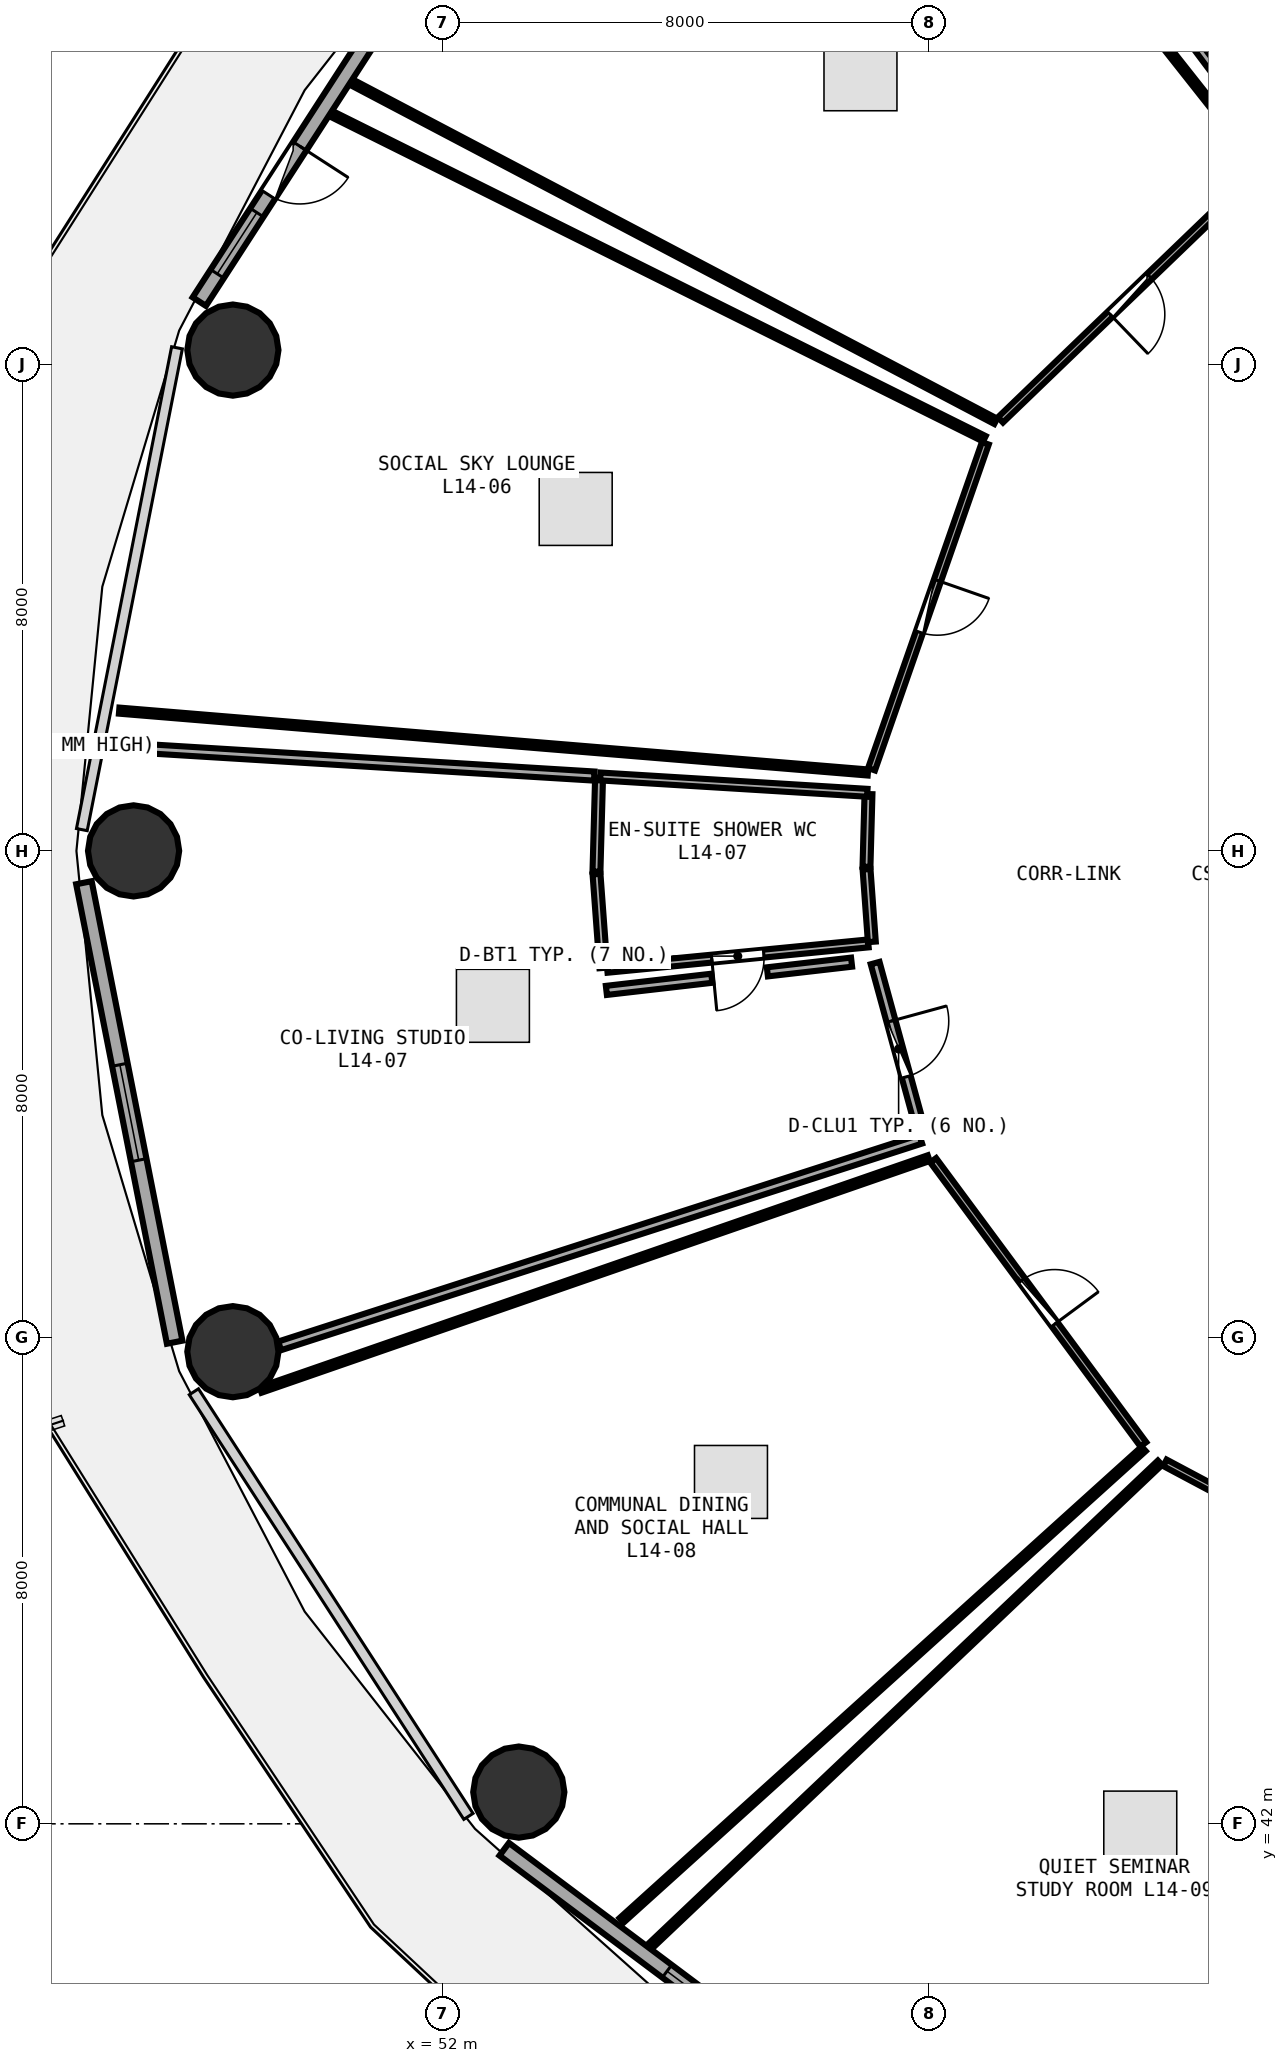
"""IFC4 building model, lengths in metres.
Left out: names, types, materials, properties, quantities, classifications, styles, units other than length and angle.
Written with IfcOpenShell. Run it as: python <this file> out.ifc"""

import sys

from ifc_helpers import new_model, si_unit, direction, frame, frame_2d, origin, origin_2d, place, context, subcontext, project, spatial, rectangle, circle, extrude, element, fill, save


model = new_model("IFC4")
c1 = context("Model", 3, precision=1e-05, world=origin(), true_north=direction((0.0, 1.0)))
c2 = subcontext(c1, "Body", "Model", "MODEL_VIEW")
j1 = project(units=[si_unit("LENGTHUNIT", "METRE"), si_unit("PLANEANGLEUNIT", "RADIAN")], contexts=[c1])
p1 = place(None, origin())
s1 = spatial("IfcSite", under=j1, at=p1, CompositionType="ELEMENT")
p2 = place(p1, origin())
s2 = spatial("IfcBuilding", under=s1, at=p2, CompositionType="ELEMENT")
p3 = place(p2, frame((0.0, 0.0, 56.25)))
s3 = spatial("IfcBuildingStorey", under=s2, at=p3, CompositionType="ELEMENT", Elevation=56.25)
for number, where, z_axis, x_axis in (
    (1, (48.553, 66.236, 0.0), (0.0, 0.0, 1.0), (1.0, 0.0, 0.0)),
    (2, (46.92, 58.0, 0.0), (0.0, 0.0, 1.0), (1.0, 0.0, 0.0)),
    (3, (48.553, 49.764, 0.0), (0.0, 0.0, 1.0), (1.0, 0.0, 0.0)),
    (4, (53.256, 42.522, 0.0), (0.0, 0.0, 1.0), (1.0, 0.0, 0.0)),
):
    element("IfcColumn", number, at=place(p3, frame(where, z_axis=z_axis, x_axis=x_axis)), inside=s3, PredefinedType="COLUMN", context=c2, shape_type="SweptSolid", body=[
        extrude(circle(Radius=0.75, at=origin_2d()), origin(), (0.0, 0.0, 1.0), 3.75),
    ])
p4 = place(p3, frame((52.311, 73.698, 0.0), z_axis=(0.0, 0.0, 1.0), x_axis=(-0.543005114258, -0.839729388488, 0.0)))
e5 = element("IfcWall", 5, at=p4, inside=s3, PredefinedType="SOLIDWALL", context=c2, shape_type="SweptSolid", body=[
    extrude(rectangle(XDim=7.938, YDim=0.26, at=frame_2d((3.969, 0.0))), origin(), (0.0, 0.0, 1.0), 3.475),
])
p5 = place(p4, frame((4.894, 0.0, 0.0)))
e6 = element("IfcOpeningElement", 6, at=p5, cuts=e5, PredefinedType="OPENING", context=c2, shape_type="SweptSolid", body=[
    extrude(rectangle(XDim=0.95, YDim=2.1, at=frame_2d((0.475, 1.05))), frame((0.0, 0.14, 0.0), z_axis=(0.0, -1.0, 0.0), x_axis=(1.0, 0.0, 0.0)), (0.0, 0.0, 1.0), 0.28),
])
p6 = place(p4, frame((6.194, 0.0, 0.85)))
e7 = element("IfcOpeningElement", 7, at=p6, cuts=e5, PredefinedType="OPENING", context=c2, shape_type="SweptSolid", body=[
    extrude(rectangle(XDim=1.2, YDim=1.45, at=frame_2d((0.6, 0.725))), frame((0.0, 0.14, 0.0), z_axis=(0.0, -1.0, 0.0), x_axis=(1.0, 0.0, 0.0)), (0.0, 0.0, 1.0), 0.28),
])
p7 = place(p3, frame((46.104, 57.477, 0.0), z_axis=(0.0, 0.0, 1.0), x_axis=(0.193726159581, -0.98105564322, 0.0)))
e8 = element("IfcWall", 8, at=p7, inside=s3, PredefinedType="SOLIDWALL", context=c2, shape_type="SweptSolid", body=[
    extrude(rectangle(XDim=7.703, YDim=0.26, at=frame_2d((3.851, 0.0))), origin(), (0.0, 0.0, 1.0), 3.475),
])
p8 = place(p7, frame((3.051, 0.0, 0.85)))
e9 = element("IfcOpeningElement", 9, at=p8, cuts=e8, PredefinedType="OPENING", context=c2, shape_type="SweptSolid", body=[
    extrude(rectangle(XDim=1.6, YDim=1.45, at=frame_2d((0.8, 0.725))), frame((0.0, 0.14, 0.0), z_axis=(0.0, -1.0, 0.0), x_axis=(1.0, 0.0, 0.0)), (0.0, 0.0, 1.0), 0.28),
])
p9 = place(p3, frame((53.016, 41.582, 0.0), z_axis=(0.0, 0.0, 1.0), x_axis=(0.80030733173, -0.599590005569, 0.0)))
e10 = element("IfcWall", 10, at=p9, inside=s3, PredefinedType="SOLIDWALL", context=c2, shape_type="SweptSolid", body=[
    extrude(rectangle(XDim=8.291, YDim=0.26, at=frame_2d((4.145, 0.0))), origin(), (0.0, 0.0, 1.0), 3.475),
])
p10 = place(p9, frame((3.345, 0.0, 0.85)))
e11 = element("IfcOpeningElement", 11, at=p10, cuts=e10, PredefinedType="OPENING", context=c2, shape_type="SweptSolid", body=[
    extrude(rectangle(XDim=1.6, YDim=1.45, at=frame_2d((0.8, 0.725))), frame((0.0, 0.14, 0.0), z_axis=(0.0, -1.0, 0.0), x_axis=(1.0, 0.0, 0.0)), (0.0, 0.0, 1.0), 0.28),
])
p11 = place(p3, frame((65.432, 69.183, 0.0), z_axis=(0.0, 0.0, 1.0), x_axis=(-0.720434955678, -0.69352251199, 0.0)))
e12 = element("IfcWall", 12, at=p11, inside=s3, PredefinedType="PARTITIONING", context=c2, shape_type="SweptSolid", body=[
    extrude(rectangle(XDim=5.906, YDim=0.12, at=frame_2d((2.953, 0.0))), origin(), (0.0, 0.0, 1.0), 2.875),
])
p12 = place(p11, frame((2.503, 0.0, 0.0)))
e13 = element("IfcOpeningElement", 13, at=p12, cuts=e12, PredefinedType="OPENING", context=c2, shape_type="SweptSolid", body=[
    extrude(rectangle(XDim=0.9, YDim=2.08, at=frame_2d((0.45, 1.04))), frame((0.0, 0.07, 0.0), z_axis=(0.0, -1.0, 0.0), x_axis=(1.0, 0.0, 0.0)), (0.0, 0.0, 1.0), 0.14),
])
p13 = place(p3, frame((60.928, 64.702, 0.0), z_axis=(0.0, 0.0, 1.0), x_axis=(-0.329626249966, -0.944111505773, 0.0)))
e14 = element("IfcWall", 14, at=p13, inside=s3, PredefinedType="PARTITIONING", context=c2, shape_type="SweptSolid", body=[
    extrude(rectangle(XDim=5.677, YDim=0.12, at=frame_2d((2.839, 0.0))), origin(), (0.0, 0.0, 1.0), 3.48),
])
p14 = place(p13, frame((2.389, 0.0, 0.0)))
e15 = element("IfcOpeningElement", 15, at=p14, cuts=e14, PredefinedType="OPENING", context=c2, shape_type="SweptSolid", body=[
    extrude(rectangle(XDim=0.9, YDim=2.08, at=frame_2d((0.45, 1.04))), frame((0.0, 0.07, 0.0), z_axis=(0.0, -1.0, 0.0), x_axis=(1.0, 0.0, 0.0)), (0.0, 0.0, 1.0), 0.14),
])
p15 = place(p3, frame((59.003, 56.478, 0.0), z_axis=(0.0, 0.0, 1.0), x_axis=(-0.995308448338, -0.096752739847, 0.0)))
e16 = element("IfcWall", 16, at=p15, inside=s3, PredefinedType="PLUMBINGWALL", context=c2, shape_type="SweptSolid", body=[
    extrude(rectangle(XDim=4.315, YDim=0.13, at=frame_2d((2.157, 0.0))), origin(), (0.0, 0.0, 1.0), 3.175),
])
p16 = place(p15, frame((1.727, 0.0, 0.0)))
e17 = element("IfcOpeningElement", 17, at=p16, cuts=e16, PredefinedType="OPENING", context=c2, shape_type="SweptSolid", body=[
    extrude(rectangle(XDim=0.86, YDim=2.05, at=frame_2d((0.43, 1.025))), frame((0.0, 0.075, 0.0), z_axis=(0.0, -1.0, 0.0), x_axis=(1.0, 0.0, 0.0)), (0.0, 0.0, 1.0), 0.15),
])
p17 = place(p3, frame((59.116, 56.155, 0.0), z_axis=(0.0, 0.0, 1.0), x_axis=(0.263653235341, -0.964617526014, 0.0)))
e18 = element("IfcWall", 18, at=p17, inside=s3, PredefinedType="PARTITIONING", context=c2, shape_type="SweptSolid", body=[
    extrude(rectangle(XDim=2.93, YDim=0.15, at=frame_2d((1.465, 0.0))), origin(), (0.0, 0.0, 1.0), 3.48),
])
p18 = place(p17, frame((0.99, 0.0, 0.0)))
e19 = element("IfcOpeningElement", 19, at=p18, cuts=e18, PredefinedType="OPENING", context=c2, shape_type="SweptSolid", body=[
    extrude(rectangle(XDim=0.95, YDim=2.08, at=frame_2d((0.475, 1.04))), frame((0.0, 0.085, 0.0), z_axis=(0.0, -1.0, 0.0), x_axis=(1.0, 0.0, 0.0)), (0.0, 0.0, 1.0), 0.17),
])
p19 = place(p3, frame((60.071, 52.912, 0.0), z_axis=(0.0, 0.0, 1.0), x_axis=(0.594763174801, -0.80390096772, 0.0)))
e20 = element("IfcWall", 20, at=p19, inside=s3, PredefinedType="PARTITIONING", context=c2, shape_type="SweptSolid", body=[
    extrude(rectangle(XDim=5.81, YDim=0.12, at=frame_2d((2.905, 0.0))), origin(), (0.0, 0.0, 1.0), 2.875),
])
p20 = place(p19, frame((2.455, 0.0, 0.0)))
e21 = element("IfcOpeningElement", 21, at=p20, cuts=e20, PredefinedType="OPENING", context=c2, shape_type="SweptSolid", body=[
    extrude(rectangle(XDim=0.9, YDim=2.08, at=frame_2d((0.45, 1.04))), frame((0.0, 0.07, 0.0), z_axis=(0.0, -1.0, 0.0), x_axis=(1.0, 0.0, 0.0)), (0.0, 0.0, 1.0), 0.14),
])
p21 = place(p3, frame((63.882, 47.937, 0.0), z_axis=(0.0, 0.0, 1.0), x_axis=(0.882584601599, -0.470153614279, 0.0)))
e22 = element("IfcWall", 22, at=p21, inside=s3, PredefinedType="PARTITIONING", context=c2, shape_type="SweptSolid", body=[
    extrude(rectangle(XDim=6.065, YDim=0.12, at=frame_2d((3.033, 0.0))), origin(), (0.0, 0.0, 1.0), 2.875),
])
p22 = place(p21, frame((2.583, 0.0, 0.0)))
e23 = element("IfcOpeningElement", 23, at=p22, cuts=e22, PredefinedType="OPENING", context=c2, shape_type="SweptSolid", body=[
    extrude(rectangle(XDim=0.9, YDim=2.08, at=frame_2d((0.45, 1.04))), frame((0.0, 0.07, 0.0), z_axis=(0.0, -1.0, 0.0), x_axis=(1.0, 0.0, 0.0)), (0.0, 0.0, 1.0), 0.14),
])
p23 = place(p3, frame((65.756, 69.443, 0.0), z_axis=(0.0, 0.0, 1.0), x_axis=(-0.599892569248, 0.800080561794, 0.0)))
e24 = element("IfcWall", 24, at=p23, inside=s3, PredefinedType="PARTITIONING", context=c2, shape_type="SweptSolid", body=[
    extrude(rectangle(XDim=11.272, YDim=0.15, at=frame_2d((5.636, 0.0))), origin(), (0.0, 0.0, 1.0), 2.875),
])
p24 = place(p3, frame((61.099, 65.065, 0.0), z_axis=(0.0, 0.0, 1.0), x_axis=(-0.884914680824, 0.46575316173, 0.0)))
e25 = element("IfcWall", 25, at=p24, inside=s3, PredefinedType="PARTITIONING", context=c2, shape_type="SweptSolid", body=[
    extrude(rectangle(XDim=11.963, YDim=0.1, at=frame_2d((5.981, 0.0))), origin(), (0.0, 0.0, 1.0), 2.875),
])
p25 = place(p3, frame((58.438, 78.13, 0.0), z_axis=(0.0, 0.0, 1.0), x_axis=(0.620037561985, -0.78457212653, 0.0)))
e26 = element("IfcWall", 26, at=p25, inside=s3, PredefinedType="PARTITIONING", context=c2, shape_type="SweptSolid", body=[
    extrude(rectangle(XDim=11.31, YDim=0.1, at=frame_2d((5.655, 0.0))), origin(), (0.0, 0.0, 1.0), 2.875),
])
p26 = place(p3, frame((58.997, 59.289, 0.0), z_axis=(0.0, 0.0, 1.0), x_axis=(-0.996604780232, 0.08233414856, 0.0)))
e27 = element("IfcWall", 27, at=p26, inside=s3, PredefinedType="PARTITIONING", context=c2, shape_type="SweptSolid", body=[
    extrude(rectangle(XDim=12.356, YDim=0.1, at=frame_2d((6.178, 0.0))), origin(), (0.0, 0.0, 1.0), 2.875),
])
p27 = place(p3, frame((50.173, 70.121, 0.0), z_axis=(0.0, 0.0, 1.0), x_axis=(0.895272258208, -0.445519453764, 0.0)))
e28 = element("IfcWall", 28, at=p27, inside=s3, PredefinedType="PARTITIONING", context=c2, shape_type="SweptSolid", body=[
    extrude(rectangle(XDim=11.996, YDim=0.1, at=frame_2d((5.998, 0.0))), origin(), (0.0, 0.0, 1.0), 2.875),
])
p28 = place(p3, frame((59.007, 58.934, 0.0), z_axis=(0.0, 0.0, 1.0), x_axis=(-0.027750076623, -0.99961489247, 0.0)))
e29 = element("IfcWall", 29, at=p28, inside=s3, PredefinedType="PLUMBINGWALL", context=c2, shape_type="SweptSolid", body=[
    extrude(rectangle(XDim=1.197, YDim=0.13, at=frame_2d((0.598, 0.0))), origin(), (0.0, 0.0, 1.0), 2.875),
])
p29 = place(p3, frame((58.975, 57.698, 0.0), z_axis=(0.0, 0.0, 1.0), x_axis=(0.072594705052, -0.99736152362, 0.0)))
e30 = element("IfcWall", 30, at=p29, inside=s3, PredefinedType="PLUMBINGWALL", context=c2, shape_type="SweptSolid", body=[
    extrude(rectangle(XDim=1.197, YDim=0.13, at=frame_2d((0.599, 0.0))), origin(), (0.0, 0.0, 1.0), 3.48),
])
p30 = place(p3, frame((54.647, 56.075, 0.0), z_axis=(0.0, 0.0, 1.0), x_axis=(-0.07367990301, 0.997281942027, 0.0)))
e31 = element("IfcWall", 31, at=p30, inside=s3, PredefinedType="PLUMBINGWALL", context=c2, shape_type="SweptSolid", body=[
    extrude(rectangle(XDim=1.547, YDim=0.13, at=frame_2d((0.774, 0.0))), origin(), (0.0, 0.0, 1.0), 3.175),
])
p31 = place(p3, frame((54.533, 57.658, 0.0), z_axis=(0.0, 0.0, 1.0), x_axis=(0.02760506688, 0.999618907526, 0.0)))
e32 = element("IfcWall", 32, at=p31, inside=s3, PredefinedType="PLUMBINGWALL", context=c2, shape_type="SweptSolid", body=[
    extrude(rectangle(XDim=1.548, YDim=0.13, at=frame_2d((0.774, 0.0))), origin(), (0.0, 0.0, 1.0), 2.875),
])
p32 = place(p3, frame((54.596, 59.224, 0.0), z_axis=(0.0, 0.0, 1.0), x_axis=(0.998131655241, -0.061099908397, 0.0)))
e33 = element("IfcWall", 33, at=p32, inside=s3, PredefinedType="PLUMBINGWALL", context=c2, shape_type="SweptSolid", body=[
    extrude(rectangle(XDim=4.399, YDim=0.13, at=frame_2d((2.2, 0.0))), origin(), (0.0, 0.0, 1.0), 3.175),
])
p33 = place(p3, frame((59.866, 53.259, 0.0), z_axis=(0.0, 0.0, 1.0), x_axis=(-0.951774856366, -0.30679736438, 0.0)))
e34 = element("IfcWall", 34, at=p33, inside=s3, PredefinedType="PARTITIONING", context=c2, shape_type="SweptSolid", body=[
    extrude(rectangle(XDim=11.078, YDim=0.15, at=frame_2d((5.539, 0.0))), origin(), (0.0, 0.0, 1.0), 2.875),
])
p34 = place(p3, frame((46.627, 59.712, 0.0), z_axis=(0.0, 0.0, 1.0), x_axis=(0.998135541011, -0.0610363971, 0.0)))
e35 = element("IfcWall", 35, at=p34, inside=s3, PredefinedType="PARTITIONING", context=c2, shape_type="SweptSolid", body=[
    extrude(rectangle(XDim=7.884, YDim=0.15, at=frame_2d((3.942, 0.0))), origin(), (0.0, 0.0, 1.0), 2.875),
])
p35 = place(p3, frame((54.696, 55.706, 0.0), z_axis=(0.0, 0.0, 1.0), x_axis=(0.993432194787, 0.114422350794, 0.0)))
e36 = element("IfcWall", 36, at=p35, inside=s3, PredefinedType="PARTITIONING", context=c2, shape_type="SweptSolid", body=[
    extrude(rectangle(XDim=1.745, YDim=0.15, at=frame_2d((0.873, 0.0))), origin(), (0.0, 0.0, 1.0), 3.175),
])
p36 = place(p3, frame((57.344, 56.011, 0.0), z_axis=(0.0, 0.0, 1.0), x_axis=(0.99343576075, 0.114391386311, 0.0)))
e37 = element("IfcWall", 37, at=p36, inside=s3, PredefinedType="PARTITIONING", context=c2, shape_type="SweptSolid", body=[
    extrude(rectangle(XDim=1.394, YDim=0.15, at=frame_2d((0.697, 0.0))), origin(), (0.0, 0.0, 1.0), 3.48),
])
p37 = place(p3, frame((63.532, 48.166, 0.0), z_axis=(0.0, 0.0, 1.0), x_axis=(-0.742191353367, -0.670188029577, 0.0)))
e38 = element("IfcWall", 38, at=p37, inside=s3, PredefinedType="PARTITIONING", context=c2, shape_type="SweptSolid", body=[
    extrude(rectangle(XDim=11.569, YDim=0.1, at=frame_2d((5.785, 0.0))), origin(), (0.0, 0.0, 1.0), 2.875),
])
p38 = place(p3, frame((49.008, 49.136, 0.0), z_axis=(0.0, 0.0, 1.0), x_axis=(0.944815756918, 0.327602175634, 0.0)))
e39 = element("IfcWall", 39, at=p38, inside=s3, PredefinedType="PARTITIONING", context=c2, shape_type="SweptSolid", body=[
    extrude(rectangle(XDim=11.632, YDim=0.1, at=frame_2d((5.816, 0.0))), origin(), (0.0, 0.0, 1.0), 2.875),
])
p39 = place(p3, frame((55.433, 40.003, 0.0), z_axis=(0.0, 0.0, 1.0), x_axis=(0.725627678847, 0.688087546531, 0.0)))
e40 = element("IfcWall", 40, at=p39, inside=s3, PredefinedType="PARTITIONING", context=c2, shape_type="SweptSolid", body=[
    extrude(rectangle(XDim=11.531, YDim=0.1, at=frame_2d((5.765, 0.0))), origin(), (0.0, 0.0, 1.0), 2.875),
])
p40 = place(p5, frame((0.95, 0.0, 0.0), z_axis=(0.0, 0.0, 1.0), x_axis=(-1.0, 0.0, 0.0)))
e41 = element("IfcDoor", 41, at=p40, inside=s3, OperationType="SINGLE_SWING_RIGHT", PredefinedType="DOOR", context=c2, shape_type="SweptSolid", body=[
    extrude(rectangle(XDim=0.95, YDim=2.1, at=frame_2d((0.475, 1.05))), frame((0.0, 0.025, 0.0), z_axis=(0.0, -1.0, 0.0), x_axis=(1.0, 0.0, 0.0)), (0.0, 0.0, 1.0), 0.05),
])
fill(e6, e41)
p41 = place(p6, origin())
e42 = element("IfcWindow", 42, at=p41, inside=s3, PartitioningType="SINGLE_PANEL", PredefinedType="WINDOW", context=c2, shape_type="SweptSolid", body=[
    extrude(rectangle(XDim=1.2, YDim=1.45, at=frame_2d((0.6, 0.725))), frame((0.0, 0.03, 0.0), z_axis=(0.0, -1.0, 0.0), x_axis=(1.0, 0.0, 0.0)), (0.0, 0.0, 1.0), 0.06),
])
fill(e7, e42)
p42 = place(p8, origin())
e43 = element("IfcWindow", 43, at=p42, inside=s3, PartitioningType="SINGLE_PANEL", PredefinedType="WINDOW", context=c2, shape_type="SweptSolid", body=[
    extrude(rectangle(XDim=1.6, YDim=1.45, at=frame_2d((0.8, 0.725))), frame((0.0, 0.03, 0.0), z_axis=(0.0, -1.0, 0.0), x_axis=(1.0, 0.0, 0.0)), (0.0, 0.0, 1.0), 0.06),
])
fill(e9, e43)
p43 = place(p10, origin())
e44 = element("IfcWindow", 44, at=p43, inside=s3, PartitioningType="SINGLE_PANEL", PredefinedType="WINDOW", context=c2, shape_type="SweptSolid", body=[
    extrude(rectangle(XDim=1.6, YDim=1.45, at=frame_2d((0.8, 0.725))), frame((0.0, 0.03, 0.0), z_axis=(0.0, -1.0, 0.0), x_axis=(1.0, 0.0, 0.0)), (0.0, 0.0, 1.0), 0.06),
])
fill(e11, e44)
p44 = place(p12, origin())
e45 = element("IfcDoor", 45, at=p44, inside=s3, OperationType="SINGLE_SWING_RIGHT", PredefinedType="DOOR", context=c2, shape_type="SweptSolid", body=[
    extrude(rectangle(XDim=0.9, YDim=2.08, at=frame_2d((0.45, 1.04))), frame((0.0, 0.025, 0.0), z_axis=(0.0, -1.0, 0.0), x_axis=(1.0, 0.0, 0.0)), (0.0, 0.0, 1.0), 0.05),
])
fill(e13, e45)
p45 = place(p14, origin())
e46 = element("IfcDoor", 46, at=p45, inside=s3, OperationType="SINGLE_SWING_LEFT", PredefinedType="DOOR", context=c2, shape_type="SweptSolid", body=[
    extrude(rectangle(XDim=0.9, YDim=2.08, at=frame_2d((0.45, 1.04))), frame((0.0, 0.025, 0.0), z_axis=(0.0, -1.0, 0.0), x_axis=(1.0, 0.0, 0.0)), (0.0, 0.0, 1.0), 0.05),
])
fill(e15, e46)
p46 = place(p16, origin())
e47 = element("IfcDoor", 47, at=p46, inside=s3, OperationType="SINGLE_SWING_RIGHT", PredefinedType="DOOR", context=c2, shape_type="SweptSolid", body=[
    extrude(rectangle(XDim=0.86, YDim=2.05, at=frame_2d((0.43, 1.025))), frame((0.0, 0.025, 0.0), z_axis=(0.0, -1.0, 0.0), x_axis=(1.0, 0.0, 0.0)), (0.0, 0.0, 1.0), 0.05),
])
fill(e17, e47)
p47 = place(p18, origin())
e48 = element("IfcDoor", 48, at=p47, inside=s3, OperationType="SINGLE_SWING_LEFT", PredefinedType="DOOR", context=c2, shape_type="SweptSolid", body=[
    extrude(rectangle(XDim=0.95, YDim=2.08, at=frame_2d((0.475, 1.04))), frame((0.0, 0.025, 0.0), z_axis=(0.0, -1.0, 0.0), x_axis=(1.0, 0.0, 0.0)), (0.0, 0.0, 1.0), 0.05),
])
fill(e19, e48)
p48 = place(p20, origin())
e49 = element("IfcDoor", 49, at=p48, inside=s3, OperationType="SINGLE_SWING_RIGHT", PredefinedType="DOOR", context=c2, shape_type="SweptSolid", body=[
    extrude(rectangle(XDim=0.9, YDim=2.08, at=frame_2d((0.45, 1.04))), frame((0.0, 0.025, 0.0), z_axis=(0.0, -1.0, 0.0), x_axis=(1.0, 0.0, 0.0)), (0.0, 0.0, 1.0), 0.05),
])
fill(e21, e49)
save(model, sys.argv[1])
